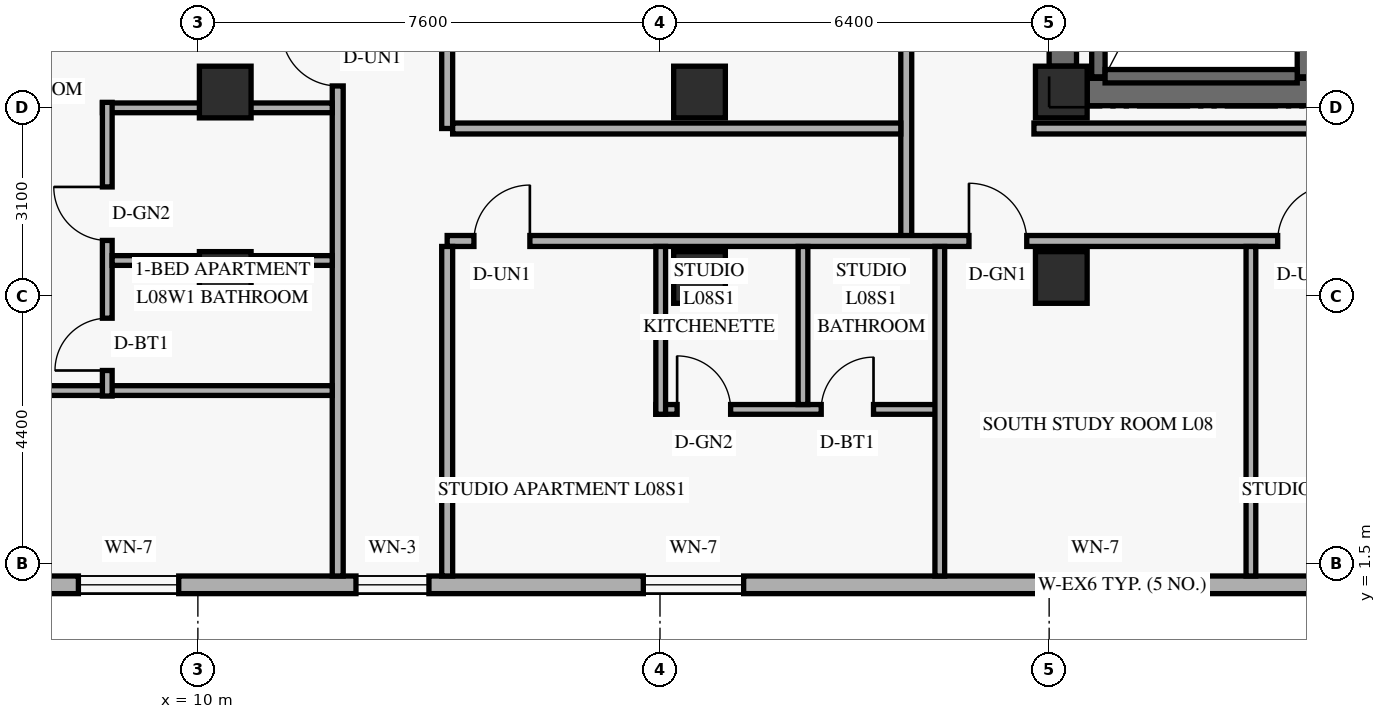
"""IFC4 building model, lengths in metres.
Left out: names, types, materials, properties, quantities, classifications, styles, units other than length and angle.
Written with IfcOpenShell. Run it as: python <this file> out.ifc"""

import sys

from ifc_helpers import new_model, si_unit, direction, frame, frame_2d, origin, origin_2d, place, context, subcontext, project, spatial, rectangle, extrude, element, fill, save


model = new_model("IFC4")
c1 = context("Model", 3, precision=1e-05, world=origin(), true_north=direction((0.0, 1.0)))
c2 = subcontext(c1, "Body", "Model", "MODEL_VIEW")
j1 = project(units=[si_unit("LENGTHUNIT", "METRE"), si_unit("PLANEANGLEUNIT", "RADIAN")], contexts=[c1])
p1 = place(None, origin())
s1 = spatial("IfcSite", under=j1, at=p1, CompositionType="ELEMENT")
p2 = place(p1, origin())
s2 = spatial("IfcBuilding", under=s1, at=p2, CompositionType="ELEMENT")
p3 = place(p2, frame((0.0, 0.0, 34.8)))
s3 = spatial("IfcBuildingStorey", under=s2, at=p3, CompositionType="ELEMENT", Elevation=34.8)
p4 = place(p3, frame((24.225, 9.675, 0.0), z_axis=(0.0, 0.0, 1.0), x_axis=(0.0, 1.0, 0.0)))
e1 = element("IfcWall", 1, at=p4, inside=s3, PredefinedType="SHEAR", context=c2, shape_type="SweptSolid", body=[
    extrude(rectangle(XDim=7.45, YDim=0.45, at=frame_2d((3.725, 0.0))), origin(), (0.0, 0.0, 1.0), 2.667),
])
p5 = place(p3, frame((24.625, 9.25, 0.0), z_axis=(0.0, 0.0, 1.0), x_axis=(1.0, 0.0, 0.0)))
e2 = element("IfcWall", 2, at=p5, inside=s3, PredefinedType="SHEAR", context=c2, shape_type="SweptSolid", body=[
    extrude(rectangle(XDim=10.15, YDim=0.45, at=frame_2d((5.075, 0.0))), origin(), (0.0, 0.0, 1.0), 3.36),
])
p6 = place(p3, frame((24.81, 9.5, 0.0), z_axis=(0.0, 0.0, 1.0), x_axis=(0.0, 1.0, 0.0)))
e3 = element("IfcWall", 3, at=p6, inside=s3, PredefinedType="SHEAR", context=c2, shape_type="SweptSolid", body=[
    extrude(rectangle(XDim=7.76, YDim=0.22, at=frame_2d((3.88, 0.0))), origin(), (0.0, 0.0, 1.0), 3.36),
])
p7 = place(p3, frame((28.23, 9.5, 0.0), z_axis=(0.0, 0.0, 1.0), x_axis=(0.0, 1.0, 0.0)))
e4 = element("IfcWall", 4, at=p7, inside=s3, PredefinedType="SHEAR", context=c2, shape_type="SweptSolid", body=[
    extrude(rectangle(XDim=7.76, YDim=0.3, at=frame_2d((3.88, 0.0))), origin(), (0.0, 0.0, 1.0), 3.36),
])
p8 = place(p3, frame((24.92, 9.51, 0.0), z_axis=(0.0, 0.0, 1.0), x_axis=(1.0, 0.0, 0.0)))
e5 = element("IfcWall", 5, at=p8, inside=s3, PredefinedType="SHEAR", context=c2, shape_type="SweptSolid", body=[
    extrude(rectangle(XDim=3.16, YDim=0.22, at=frame_2d((1.58, 0.0))), origin(), (0.0, 0.0, 1.0), 3.36),
])
for number, where, z_axis, x_axis in (
    (6, (10.45, 6.2, 0.0), (0.0, 0.0, 1.0), (1.0, 0.0, 0.0)),
    (7, (10.45, 9.25, 0.0), (0.0, 0.0, 1.0), (1.0, 0.0, 0.0)),
    (8, (18.25, 6.2, 0.0), (0.0, 0.0, 1.0), (1.0, 0.0, 0.0)),
    (9, (18.25, 9.25, 0.0), (0.0, 0.0, 1.0), (1.0, 0.0, 0.0)),
    (10, (24.2, 6.2, 0.0), (0.0, 0.0, 1.0), (1.0, 0.0, 0.0)),
    (11, (24.2, 9.25, 0.0), (0.0, 0.0, 1.0), (1.0, 0.0, 0.0)),
):
    element("IfcColumn", number, at=place(p3, frame(where, z_axis=z_axis, x_axis=x_axis)), inside=s3, PredefinedType="COLUMN", context=c2, shape_type="SweptSolid", body=[
        extrude(rectangle(XDim=0.85, YDim=0.85, at=origin_2d()), origin(), (0.0, 0.0, 1.0), 3.6),
    ])
p9 = place(p3, frame((5.42, 1.145, 0.0), z_axis=(0.0, 0.0, 1.0), x_axis=(1.0, 0.0, 0.0)))
e12 = element("IfcWall", 12, at=p9, inside=s3, PredefinedType="SOLIDWALL", context=c2, shape_type="SweptSolid", body=[
    extrude(rectangle(XDim=39.56, YDim=0.29, at=frame_2d((19.78, 0.0))), origin(), (0.0, 0.0, 1.0), 3.36),
])
p10 = place(p9, frame((2.615, 0.0, 0.85)))
e13 = element("IfcOpeningElement", 13, at=p10, cuts=e12, PredefinedType="OPENING", context=c2, shape_type="SweptSolid", body=[
    extrude(rectangle(XDim=1.65, YDim=1.6, at=frame_2d((0.825, 0.8))), frame((0.0, 0.155, 0.0), z_axis=(0.0, -1.0, 0.0), x_axis=(1.0, 0.0, 0.0)), (0.0, 0.0, 1.0), 0.31),
])
p11 = place(p9, frame((7.18, 0.0, 0.85)))
e14 = element("IfcOpeningElement", 14, at=p11, cuts=e12, PredefinedType="OPENING", context=c2, shape_type="SweptSolid", body=[
    extrude(rectangle(XDim=1.2, YDim=1.5, at=frame_2d((0.6, 0.75))), frame((0.0, 0.155, 0.0), z_axis=(0.0, -1.0, 0.0), x_axis=(1.0, 0.0, 0.0)), (0.0, 0.0, 1.0), 0.31),
])
p12 = place(p9, frame((11.906, 0.0, 0.85)))
e15 = element("IfcOpeningElement", 15, at=p12, cuts=e12, PredefinedType="OPENING", context=c2, shape_type="SweptSolid", body=[
    extrude(rectangle(XDim=1.65, YDim=1.6, at=frame_2d((0.825, 0.8))), frame((0.0, 0.155, 0.0), z_axis=(0.0, -1.0, 0.0), x_axis=(1.0, 0.0, 0.0)), (0.0, 0.0, 1.0), 0.31),
])
p13 = place(p9, frame((18.515, 0.0, 0.85)))
e16 = element("IfcOpeningElement", 16, at=p13, cuts=e12, PredefinedType="OPENING", context=c2, shape_type="SweptSolid", body=[
    extrude(rectangle(XDim=1.65, YDim=1.6, at=frame_2d((0.825, 0.8))), frame((0.0, 0.155, 0.0), z_axis=(0.0, -1.0, 0.0), x_axis=(1.0, 0.0, 0.0)), (0.0, 0.0, 1.0), 0.31),
])
p14 = place(p9, frame((25.124, 0.0, 0.85)))
e17 = element("IfcOpeningElement", 17, at=p14, cuts=e12, PredefinedType="OPENING", context=c2, shape_type="SweptSolid", body=[
    extrude(rectangle(XDim=1.65, YDim=1.6, at=frame_2d((0.825, 0.8))), frame((0.0, 0.155, 0.0), z_axis=(0.0, -1.0, 0.0), x_axis=(1.0, 0.0, 0.0)), (0.0, 0.0, 1.0), 0.31),
])
p15 = place(p9, frame((30.465, 0.0, 0.85)))
e18 = element("IfcOpeningElement", 18, at=p15, cuts=e12, PredefinedType="OPENING", context=c2, shape_type="SweptSolid", body=[
    extrude(rectangle(XDim=1.2, YDim=1.5, at=frame_2d((0.6, 0.75))), frame((0.0, 0.155, 0.0), z_axis=(0.0, -1.0, 0.0), x_axis=(1.0, 0.0, 0.0)), (0.0, 0.0, 1.0), 0.31),
])
p16 = place(p9, frame((32.613, 0.0, 0.85)))
e19 = element("IfcOpeningElement", 19, at=p16, cuts=e12, PredefinedType="OPENING", context=c2, shape_type="SweptSolid", body=[
    extrude(rectangle(XDim=1.65, YDim=1.6, at=frame_2d((0.825, 0.8))), frame((0.0, 0.155, 0.0), z_axis=(0.0, -1.0, 0.0), x_axis=(1.0, 0.0, 0.0)), (0.0, 0.0, 1.0), 0.31),
])
p17 = place(p9, frame((36.328, 0.0, 0.85)))
e20 = element("IfcOpeningElement", 20, at=p17, cuts=e12, PredefinedType="OPENING", context=c2, shape_type="SweptSolid", body=[
    extrude(rectangle(XDim=1.65, YDim=1.6, at=frame_2d((0.825, 0.8))), frame((0.0, 0.155, 0.0), z_axis=(0.0, -1.0, 0.0), x_axis=(1.0, 0.0, 0.0)), (0.0, 0.0, 1.0), 0.31),
])
p18 = place(p3, frame((21.65, 6.8, 0.0), z_axis=(0.0, 0.0, 1.0), x_axis=(0.0, 1.0, 0.0)))
e21 = element("IfcWall", 21, at=p18, inside=s3, PredefinedType="STANDARD", context=c2, shape_type="SweptSolid", body=[
    extrude(rectangle(XDim=34.4, YDim=0.18, at=frame_2d((17.2, 0.0))), origin(), (0.0, 0.0, 1.0), 2.649),
])
p19 = place(p3, frame((14.1, 6.8, 0.0), z_axis=(0.0, 0.0, 1.0), x_axis=(1.0, 0.0, 0.0)))
e22 = element("IfcWall", 22, at=p19, inside=s3, PredefinedType="STANDARD", context=c2, shape_type="SweptSolid", body=[
    extrude(rectangle(XDim=21.32, YDim=0.18, at=frame_2d((10.66, 0.0))), origin(), (0.0, 0.0, 1.0), 2.649),
])
p20 = place(p19, frame((0.44, 0.0, 0.0)))
e23 = element("IfcOpeningElement", 23, at=p20, cuts=e22, PredefinedType="OPENING", context=c2, shape_type="SweptSolid", body=[
    extrude(rectangle(XDim=0.92, YDim=2.15, at=frame_2d((0.46, 1.075))), frame((0.0, 0.1, 0.0), z_axis=(0.0, -1.0, 0.0), x_axis=(1.0, 0.0, 0.0)), (0.0, 0.0, 1.0), 0.2),
])
p21 = place(p19, frame((8.582, 0.0, 0.0)))
e24 = element("IfcOpeningElement", 24, at=p21, cuts=e22, PredefinedType="OPENING", context=c2, shape_type="SweptSolid", body=[
    extrude(rectangle(XDim=0.95, YDim=2.15, at=frame_2d((0.475, 1.075))), frame((0.0, 0.1, 0.0), z_axis=(0.0, -1.0, 0.0), x_axis=(1.0, 0.0, 0.0)), (0.0, 0.0, 1.0), 0.2),
])
p22 = place(p19, frame((13.658, 0.0, 0.0)))
e25 = element("IfcOpeningElement", 25, at=p22, cuts=e22, PredefinedType="OPENING", context=c2, shape_type="SweptSolid", body=[
    extrude(rectangle(XDim=0.92, YDim=2.15, at=frame_2d((0.46, 1.075))), frame((0.0, 0.1, 0.0), z_axis=(0.0, -1.0, 0.0), x_axis=(1.0, 0.0, 0.0)), (0.0, 0.0, 1.0), 0.2),
])
p23 = place(p3, frame((23.75, 8.65, 0.0), z_axis=(0.0, 0.0, 1.0), x_axis=(1.0, 0.0, 0.0)))
e26 = element("IfcWall", 26, at=p23, inside=s3, PredefinedType="STANDARD", context=c2, shape_type="SweptSolid", body=[
    extrude(rectangle(XDim=11.67, YDim=0.18, at=frame_2d((5.835, 0.0))), origin(), (0.0, 0.0, 1.0), 2.649),
])
p24 = place(p3, frame((12.3, 1.29, 0.0), z_axis=(0.0, 0.0, 1.0), x_axis=(0.0, 1.0, 0.0)))
e27 = element("IfcWall", 27, at=p24, inside=s3, PredefinedType="STANDARD", context=c2, shape_type="SweptSolid", body=[
    extrude(rectangle(XDim=45.42, YDim=0.18, at=frame_2d((22.71, 0.0))), origin(), (0.0, 0.0, 1.0), 2.649),
])
p25 = place(p24, frame((8.06, 0.0, 0.0)))
e28 = element("IfcOpeningElement", 28, at=p25, cuts=e27, PredefinedType="OPENING", context=c2, shape_type="SweptSolid", body=[
    extrude(rectangle(XDim=0.92, YDim=2.15, at=frame_2d((0.46, 1.075))), frame((0.0, 0.1, 0.0), z_axis=(0.0, -1.0, 0.0), x_axis=(1.0, 0.0, 0.0)), (0.0, 0.0, 1.0), 0.2),
])
p26 = place(p24, frame((21.021, 0.0, 0.0)))
e29 = element("IfcOpeningElement", 29, at=p26, cuts=e27, PredefinedType="OPENING", context=c2, shape_type="SweptSolid", body=[
    extrude(rectangle(XDim=0.92, YDim=2.15, at=frame_2d((0.46, 1.075))), frame((0.0, 0.1, 0.0), z_axis=(0.0, -1.0, 0.0), x_axis=(1.0, 0.0, 0.0)), (0.0, 0.0, 1.0), 0.2),
])
p27 = place(p24, frame((35.99, 0.0, 0.0)))
e30 = element("IfcOpeningElement", 30, at=p27, cuts=e27, PredefinedType="OPENING", context=c2, shape_type="SweptSolid", body=[
    extrude(rectangle(XDim=0.92, YDim=2.15, at=frame_2d((0.46, 1.075))), frame((0.0, 0.1, 0.0), z_axis=(0.0, -1.0, 0.0), x_axis=(1.0, 0.0, 0.0)), (0.0, 0.0, 1.0), 0.2),
])
p28 = place(p3, frame((14.1, 8.65, 0.0), z_axis=(0.0, 0.0, 1.0), x_axis=(0.0, 1.0, 0.0)))
e31 = element("IfcWall", 31, at=p28, inside=s3, PredefinedType="STANDARD", context=c2, shape_type="SweptSolid", body=[
    extrude(rectangle(XDim=30.7, YDim=0.18, at=frame_2d((15.35, 0.0))), origin(), (0.0, 0.0, 1.0), 2.649),
])
p29 = place(p28, frame((7.675, 0.0, 0.0)))
e32 = element("IfcOpeningElement", 32, at=p29, cuts=e31, PredefinedType="OPENING", context=c2, shape_type="SweptSolid", body=[
    extrude(rectangle(XDim=0.95, YDim=2.15, at=frame_2d((0.475, 1.075))), frame((0.0, 0.1, 0.0), z_axis=(0.0, -1.0, 0.0), x_axis=(1.0, 0.0, 0.0)), (0.0, 0.0, 1.0), 0.2),
])
p30 = place(p28, frame((23.025, 0.0, 0.0)))
e33 = element("IfcOpeningElement", 33, at=p30, cuts=e31, PredefinedType="OPENING", context=c2, shape_type="SweptSolid", body=[
    extrude(rectangle(XDim=0.9, YDim=2.1, at=frame_2d((0.45, 1.05))), frame((0.0, 0.1, 0.0), z_axis=(0.0, -1.0, 0.0), x_axis=(1.0, 0.0, 0.0)), (0.0, 0.0, 1.0), 0.2),
])
p31 = place(p3, frame((14.19, 8.65, 0.0), z_axis=(0.0, 0.0, 1.0), x_axis=(1.0, 0.0, 0.0)))
e34 = element("IfcWall", 34, at=p31, inside=s3, PredefinedType="STANDARD", context=c2, shape_type="SweptSolid", body=[
    extrude(rectangle(XDim=7.37, YDim=0.18, at=frame_2d((3.685, 0.0))), origin(), (0.0, 0.0, 1.0), 2.649),
])
p32 = place(p3, frame((14.1, 1.29, 0.0), z_axis=(0.0, 0.0, 1.0), x_axis=(0.0, 1.0, 0.0)))
e35 = element("IfcWall", 35, at=p32, inside=s3, PredefinedType="PARTITIONING", context=c2, shape_type="SweptSolid", body=[
    extrude(rectangle(XDim=5.42, YDim=0.18, at=frame_2d((2.71, 0.0))), origin(), (0.0, 0.0, 1.0), 2.809),
])
p33 = place(p3, frame((2.142, 4.34, 0.0), z_axis=(0.0, 0.0, 1.0), x_axis=(1.0, 0.0, 0.0)))
e36 = element("IfcWall", 36, at=p33, inside=s3, PredefinedType="PARTITIONING", context=c2, shape_type="SweptSolid", body=[
    extrude(rectangle(XDim=10.068, YDim=0.16, at=frame_2d((5.034, 0.0))), origin(), (0.0, 0.0, 1.0), 3.36),
])
p34 = place(p33, frame((2.548, 0.0, 0.0)))
e37 = element("IfcOpeningElement", 37, at=p34, cuts=e36, PredefinedType="OPENING", context=c2, shape_type="SweptSolid", body=[
    extrude(rectangle(XDim=0.9, YDim=2.14, at=frame_2d((0.45, 1.07))), frame((0.0, 0.09, 0.0), z_axis=(0.0, -1.0, 0.0), x_axis=(1.0, 0.0, 0.0)), (0.0, 0.0, 1.0), 0.18),
])
p35 = place(p3, frame((8.43, 8.99, 0.0), z_axis=(0.0, 0.0, 1.0), x_axis=(1.0, 0.0, 0.0)))
e38 = element("IfcWall", 38, at=p35, inside=s3, PredefinedType="PLUMBINGWALL", context=c2, shape_type="SweptSolid", body=[
    extrude(rectangle(XDim=3.78, YDim=0.16, at=frame_2d((1.89, 0.0))), origin(), (0.0, 0.0, 1.0), 3.36),
])
p36 = place(p3, frame((8.51, 4.25, 0.0), z_axis=(0.0, 0.0, 1.0), x_axis=(0.0, 1.0, 0.0)))
e39 = element("IfcWall", 39, at=p36, inside=s3, PredefinedType="PLUMBINGWALL", context=c2, shape_type="SweptSolid", body=[
    extrude(rectangle(XDim=4.83, YDim=0.16, at=frame_2d((2.415, 0.0))), origin(), (0.0, 0.0, 1.0), 2.809),
])
p37 = place(p36, frame((0.42, 0.0, 0.0)))
e40 = element("IfcOpeningElement", 40, at=p37, cuts=e39, PredefinedType="OPENING", context=c2, shape_type="SweptSolid", body=[
    extrude(rectangle(XDim=0.86, YDim=2.12, at=frame_2d((0.43, 1.06))), frame((0.0, 0.09, 0.0), z_axis=(0.0, -1.0, 0.0), x_axis=(1.0, 0.0, 0.0)), (0.0, 0.0, 1.0), 0.18),
])
p38 = place(p36, frame((2.559, 0.0, 0.0)))
e41 = element("IfcOpeningElement", 41, at=p38, cuts=e39, PredefinedType="OPENING", context=c2, shape_type="SweptSolid", body=[
    extrude(rectangle(XDim=0.88, YDim=2.12, at=frame_2d((0.44, 1.06))), frame((0.0, 0.09, 0.0), z_axis=(0.0, -1.0, 0.0), x_axis=(1.0, 0.0, 0.0)), (0.0, 0.0, 1.0), 0.18),
])
p39 = place(p3, frame((8.59, 6.479, 0.0), z_axis=(0.0, 0.0, 1.0), x_axis=(1.0, 0.0, 0.0)))
e42 = element("IfcWall", 42, at=p39, inside=s3, PredefinedType="PLUMBINGWALL", context=c2, shape_type="SweptSolid", body=[
    extrude(rectangle(XDim=3.62, YDim=0.16, at=frame_2d((1.81, 0.0))), origin(), (0.0, 0.0, 1.0), 3.36),
])
p40 = place(p3, frame((17.531, 4.03, 0.0), z_axis=(0.0, 0.0, 1.0), x_axis=(1.0, 0.0, 0.0)))
e43 = element("IfcWall", 43, at=p40, inside=s3, PredefinedType="PLUMBINGWALL", context=c2, shape_type="SweptSolid", body=[
    extrude(rectangle(XDim=4.67, YDim=0.16, at=frame_2d((2.335, 0.0))), origin(), (0.0, 0.0, 1.0), 3.36),
])
p41 = place(p40, frame((0.35, 0.0, 0.0)))
e44 = element("IfcOpeningElement", 44, at=p41, cuts=e43, PredefinedType="OPENING", context=c2, shape_type="SweptSolid", body=[
    extrude(rectangle(XDim=0.88, YDim=2.12, at=frame_2d((0.44, 1.06))), frame((0.0, 0.09, 0.0), z_axis=(0.0, -1.0, 0.0), x_axis=(1.0, 0.0, 0.0)), (0.0, 0.0, 1.0), 0.18),
])
p42 = place(p40, frame((2.72, 0.0, 0.0)))
e45 = element("IfcOpeningElement", 45, at=p42, cuts=e43, PredefinedType="OPENING", context=c2, shape_type="SweptSolid", body=[
    extrude(rectangle(XDim=0.86, YDim=2.12, at=frame_2d((0.43, 1.06))), frame((0.0, 0.09, 0.0), z_axis=(0.0, -1.0, 0.0), x_axis=(1.0, 0.0, 0.0)), (0.0, 0.0, 1.0), 0.18),
])
p43 = place(p3, frame((17.612, 3.95, 0.0), z_axis=(0.0, 0.0, 1.0), x_axis=(0.0, 1.0, 0.0)))
e46 = element("IfcWall", 46, at=p43, inside=s3, PredefinedType="PLUMBINGWALL", context=c2, shape_type="SweptSolid", body=[
    extrude(rectangle(XDim=2.76, YDim=0.16, at=frame_2d((1.38, 0.0))), origin(), (0.0, 0.0, 1.0), 2.809),
])
p44 = place(p3, frame((19.952, 4.11, 0.0), z_axis=(0.0, 0.0, 1.0), x_axis=(0.0, 1.0, 0.0)))
e47 = element("IfcWall", 47, at=p44, inside=s3, PredefinedType="PLUMBINGWALL", context=c2, shape_type="SweptSolid", body=[
    extrude(rectangle(XDim=2.6, YDim=0.16, at=frame_2d((1.3, 0.0))), origin(), (0.0, 0.0, 1.0), 2.809),
])
for number, where, z_axis, x_axis in (
    (48, (22.202, 1.29, 0.0), (0.0, 0.0, 1.0), (0.0, 1.0, 0.0)),
    (49, (27.318, 1.29, 0.0), (0.0, 0.0, 1.0), (0.0, 1.0, 0.0)),
):
    element("IfcWall", number, at=place(p3, frame(where, z_axis=z_axis, x_axis=x_axis)), inside=s3, PredefinedType="PARTITIONING", context=c2, shape_type="SweptSolid", body=[
        extrude(rectangle(XDim=5.42, YDim=0.16, at=frame_2d((2.71, 0.0))), origin(), (0.0, 0.0, 1.0), 2.809),
    ])
p45 = place(p10, origin())
e50 = element("IfcWindow", 50, at=p45, inside=s3, PartitioningType="SINGLE_PANEL", PredefinedType="WINDOW", context=c2, shape_type="SweptSolid", body=[
    extrude(rectangle(XDim=1.65, YDim=1.6, at=frame_2d((0.825, 0.8))), frame((0.0, 0.03, 0.0), z_axis=(0.0, -1.0, 0.0), x_axis=(1.0, 0.0, 0.0)), (0.0, 0.0, 1.0), 0.06),
])
fill(e13, e50)
p46 = place(p11, origin())
e51 = element("IfcWindow", 51, at=p46, inside=s3, PartitioningType="SINGLE_PANEL", PredefinedType="WINDOW", context=c2, shape_type="SweptSolid", body=[
    extrude(rectangle(XDim=1.2, YDim=1.5, at=frame_2d((0.6, 0.75))), frame((0.0, 0.03, 0.0), z_axis=(0.0, -1.0, 0.0), x_axis=(1.0, 0.0, 0.0)), (0.0, 0.0, 1.0), 0.06),
])
fill(e14, e51)
p47 = place(p12, origin())
e52 = element("IfcWindow", 52, at=p47, inside=s3, PartitioningType="SINGLE_PANEL", PredefinedType="WINDOW", context=c2, shape_type="SweptSolid", body=[
    extrude(rectangle(XDim=1.65, YDim=1.6, at=frame_2d((0.825, 0.8))), frame((0.0, 0.03, 0.0), z_axis=(0.0, -1.0, 0.0), x_axis=(1.0, 0.0, 0.0)), (0.0, 0.0, 1.0), 0.06),
])
fill(e15, e52)
p48 = place(p13, origin())
e53 = element("IfcWindow", 53, at=p48, inside=s3, PartitioningType="SINGLE_PANEL", PredefinedType="WINDOW", context=c2, shape_type="SweptSolid", body=[
    extrude(rectangle(XDim=1.65, YDim=1.6, at=frame_2d((0.825, 0.8))), frame((0.0, 0.03, 0.0), z_axis=(0.0, -1.0, 0.0), x_axis=(1.0, 0.0, 0.0)), (0.0, 0.0, 1.0), 0.06),
])
fill(e16, e53)
p49 = place(p25, origin())
e54 = element("IfcDoor", 54, at=p49, inside=s3, OperationType="SINGLE_SWING_RIGHT", PredefinedType="DOOR", context=c2, shape_type="SweptSolid", body=[
    extrude(rectangle(XDim=0.92, YDim=2.15, at=frame_2d((0.46, 1.075))), frame((0.0, 0.025, 0.0), z_axis=(0.0, -1.0, 0.0), x_axis=(1.0, 0.0, 0.0)), (0.0, 0.0, 1.0), 0.05),
])
fill(e28, e54)
p50 = place(p37, origin())
e55 = element("IfcDoor", 55, at=p50, inside=s3, OperationType="SINGLE_SWING_LEFT", PredefinedType="DOOR", context=c2, shape_type="SweptSolid", body=[
    extrude(rectangle(XDim=0.86, YDim=2.12, at=frame_2d((0.43, 1.06))), frame((0.0, 0.025, 0.0), z_axis=(0.0, -1.0, 0.0), x_axis=(1.0, 0.0, 0.0)), (0.0, 0.0, 1.0), 0.05),
])
fill(e40, e55)
p51 = place(p38, origin())
e56 = element("IfcDoor", 56, at=p51, inside=s3, OperationType="SINGLE_SWING_RIGHT", PredefinedType="DOOR", context=c2, shape_type="SweptSolid", body=[
    extrude(rectangle(XDim=0.88, YDim=2.12, at=frame_2d((0.44, 1.06))), frame((0.0, 0.025, 0.0), z_axis=(0.0, -1.0, 0.0), x_axis=(1.0, 0.0, 0.0)), (0.0, 0.0, 1.0), 0.05),
])
fill(e41, e56)
p52 = place(p20, origin())
e57 = element("IfcDoor", 57, at=p52, inside=s3, OperationType="SINGLE_SWING_RIGHT", PredefinedType="DOOR", context=c2, shape_type="SweptSolid", body=[
    extrude(rectangle(XDim=0.92, YDim=2.15, at=frame_2d((0.46, 1.075))), frame((0.0, 0.025, 0.0), z_axis=(0.0, -1.0, 0.0), x_axis=(1.0, 0.0, 0.0)), (0.0, 0.0, 1.0), 0.05),
])
fill(e23, e57)
p53 = place(p41, origin())
e58 = element("IfcDoor", 58, at=p53, inside=s3, OperationType="SINGLE_SWING_LEFT", PredefinedType="DOOR", context=c2, shape_type="SweptSolid", body=[
    extrude(rectangle(XDim=0.88, YDim=2.12, at=frame_2d((0.44, 1.06))), frame((0.0, 0.025, 0.0), z_axis=(0.0, -1.0, 0.0), x_axis=(1.0, 0.0, 0.0)), (0.0, 0.0, 1.0), 0.05),
])
fill(e44, e58)
p54 = place(p42, origin())
e59 = element("IfcDoor", 59, at=p54, inside=s3, OperationType="SINGLE_SWING_RIGHT", PredefinedType="DOOR", context=c2, shape_type="SweptSolid", body=[
    extrude(rectangle(XDim=0.86, YDim=2.12, at=frame_2d((0.43, 1.06))), frame((0.0, 0.025, 0.0), z_axis=(0.0, -1.0, 0.0), x_axis=(1.0, 0.0, 0.0)), (0.0, 0.0, 1.0), 0.05),
])
fill(e45, e59)
p55 = place(p21, origin())
e60 = element("IfcDoor", 60, at=p55, inside=s3, OperationType="SINGLE_SWING_LEFT", PredefinedType="DOOR", context=c2, shape_type="SweptSolid", body=[
    extrude(rectangle(XDim=0.95, YDim=2.15, at=frame_2d((0.475, 1.075))), frame((0.0, 0.025, 0.0), z_axis=(0.0, -1.0, 0.0), x_axis=(1.0, 0.0, 0.0)), (0.0, 0.0, 1.0), 0.05),
])
fill(e24, e60)
p56 = place(p22, origin())
e61 = element("IfcDoor", 61, at=p56, inside=s3, OperationType="SINGLE_SWING_RIGHT", PredefinedType="DOOR", context=c2, shape_type="SweptSolid", body=[
    extrude(rectangle(XDim=0.92, YDim=2.15, at=frame_2d((0.46, 1.075))), frame((0.0, 0.025, 0.0), z_axis=(0.0, -1.0, 0.0), x_axis=(1.0, 0.0, 0.0)), (0.0, 0.0, 1.0), 0.05),
])
fill(e25, e61)
save(model, sys.argv[1])
